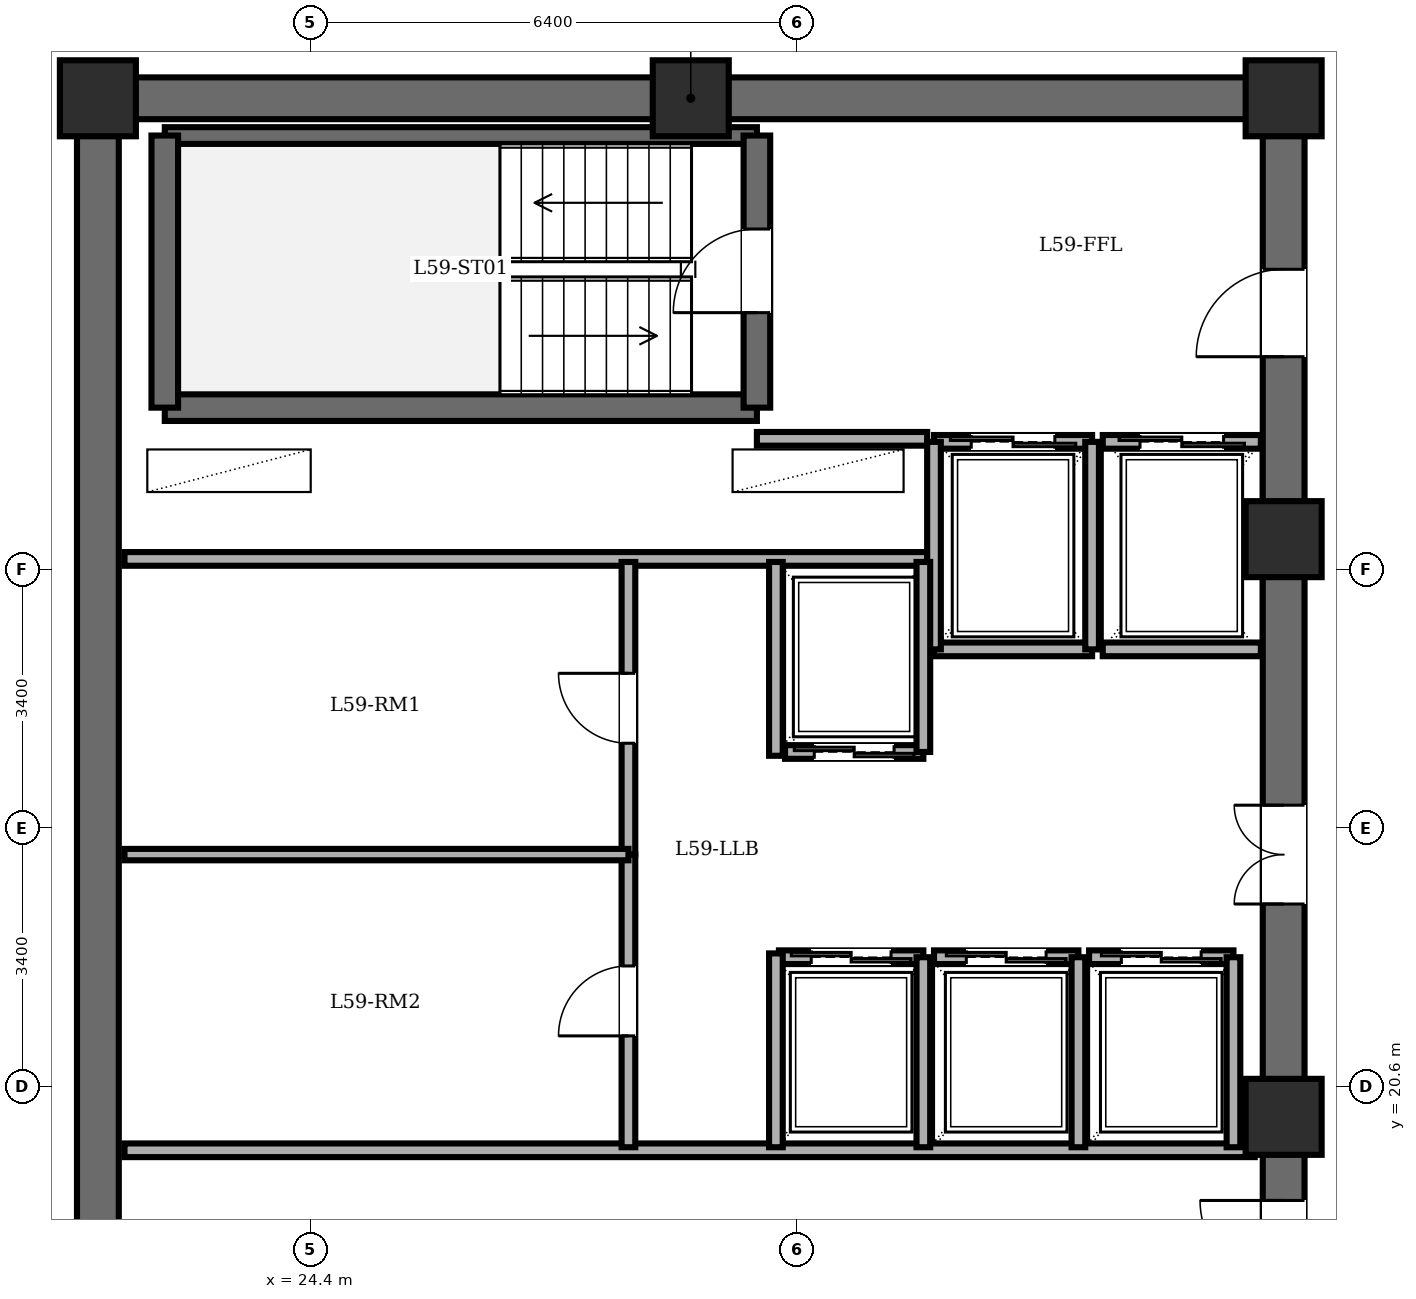
"""IFC4 building model, lengths in metres.
Left out: names, types, materials, properties, quantities, classifications, styles, units other than length and angle.
Written with IfcOpenShell. Run it as: python <this file> out.ifc"""

import sys

from ifc_helpers import new_model, si_unit, direction, frame, frame_2d, origin, origin_2d, place, context, subcontext, project, spatial, rectangle, extrude, element, fill, save


model = new_model("IFC4")
c1 = context("Model", 3, precision=1e-05, world=origin(), true_north=direction((0.0, 1.0)))
c2 = subcontext(c1, "Body", "Model", "MODEL_VIEW")
j1 = project(units=[si_unit("LENGTHUNIT", "METRE"), si_unit("PLANEANGLEUNIT", "RADIAN")], contexts=[c1])
p1 = place(None, origin())
s1 = spatial("IfcSite", under=j1, at=p1, CompositionType="ELEMENT")
p2 = place(p1, origin())
s2 = spatial("IfcBuilding", under=s1, at=p2, CompositionType="ELEMENT")
p3 = place(p2, frame((0.0, 0.0, 226.5)))
s3 = spatial("IfcBuildingStorey", under=s2, at=p3, CompositionType="ELEMENT", Elevation=226.5)
for number, where, z_axis, x_axis in (
    (1, (37.2, 20.2, 0.0), (0.0, 0.0, 1.0), (1.0, 0.0, 0.0)),
    (2, (37.2, 27.8, 0.0), (0.0, 0.0, 1.0), (1.0, 0.0, 0.0)),
    (3, (37.2, 33.6, 0.0), (0.0, 0.0, 1.0), (1.0, 0.0, 0.0)),
    (4, (29.4, 33.6, 0.0), (0.0, 0.0, 1.0), (1.0, 0.0, 0.0)),
    (5, (21.6, 33.6, 0.0), (0.0, 0.0, 1.0), (1.0, 0.0, 0.0)),
):
    element("IfcColumn", number, at=place(p3, frame(where, z_axis=z_axis, x_axis=x_axis)), inside=s3, PredefinedType="COLUMN", context=c2, shape_type="SweptSolid", body=[
        extrude(rectangle(XDim=1.0, YDim=1.0, at=origin_2d()), origin(), (0.0, 0.0, 1.0), 3.6),
    ])
p4 = place(p3, frame((21.6, 14.4, 0.0), z_axis=(0.0, 0.0, 1.0), x_axis=(0.0, 1.0, 0.0)))
e6 = element("IfcWall", 6, at=p4, inside=s3, PredefinedType="SHEAR", context=c2, shape_type="SweptSolid", body=[
    extrude(rectangle(XDim=19.2, YDim=0.55, at=frame_2d((9.6, 0.0))), origin(), (0.0, 0.0, 1.0), 3.4),
])
p5 = place(p3, frame((21.6, 33.6, 0.0), z_axis=(0.0, 0.0, 1.0), x_axis=(1.0, 0.0, 0.0)))
e7 = element("IfcWall", 7, at=p5, inside=s3, PredefinedType="SHEAR", context=c2, shape_type="SweptSolid", body=[
    extrude(rectangle(XDim=15.6, YDim=0.55, at=frame_2d((7.8, 0.0))), origin(), (0.0, 0.0, 1.0), 3.4),
])
p6 = place(p3, frame((37.2, 14.4, 0.0), z_axis=(0.0, 0.0, 1.0), x_axis=(0.0, 1.0, 0.0)))
e8 = element("IfcWall", 8, at=p6, inside=s3, PredefinedType="SHEAR", context=c2, shape_type="SweptSolid", body=[
    extrude(rectangle(XDim=19.2, YDim=0.55, at=frame_2d((9.6, 0.0))), origin(), (0.0, 0.0, 1.0), 3.4),
])
p7 = place(p6, frame((15.8, 0.0, 0.0)))
e9 = element("IfcOpeningElement", 9, at=p7, cuts=e8, PredefinedType="OPENING", context=c2, shape_type="SweptSolid", body=[
    extrude(rectangle(XDim=1.15, YDim=2.15, at=frame_2d((0.575, 1.075))), frame((0.0, 0.285, 0.0), z_axis=(0.0, -1.0, 0.0), x_axis=(1.0, 0.0, 0.0)), (0.0, 0.0, 1.0), 0.57),
])
p8 = place(p6, frame((3.6, 0.0, 0.0)))
e10 = element("IfcOpeningElement", 10, at=p8, cuts=e8, PredefinedType="OPENING", context=c2, shape_type="SweptSolid", body=[
    extrude(rectangle(XDim=1.1, YDim=2.15, at=frame_2d((0.55, 1.075))), frame((0.0, 0.285, 0.0), z_axis=(0.0, -1.0, 0.0), x_axis=(1.0, 0.0, 0.0)), (0.0, 0.0, 1.0), 0.57),
])
p9 = place(p6, frame((8.6, 0.0, 0.0)))
e11 = element("IfcOpeningElement", 11, at=p9, cuts=e8, PredefinedType="OPENING", context=c2, shape_type="SweptSolid", body=[
    extrude(rectangle(XDim=1.3, YDim=2.2, at=frame_2d((0.65, 1.1))), frame((0.0, 0.285, 0.0), z_axis=(0.0, -1.0, 0.0), x_axis=(1.0, 0.0, 0.0)), (0.0, 0.0, 1.0), 0.57),
])
p10 = place(p3, frame((22.48, 29.53, 0.0), z_axis=(0.0, 0.0, 1.0), x_axis=(1.0, 0.0, 0.0)))
e12 = element("IfcWall", 12, at=p10, inside=s3, PredefinedType="SOLIDWALL", context=c2, shape_type="SweptSolid", body=[
    extrude(rectangle(XDim=7.79, YDim=0.35, at=frame_2d((3.895, 0.0))), origin(), (0.0, 0.0, 1.0), 3.4),
])
p11 = place(p3, frame((22.48, 33.11, 0.0), z_axis=(0.0, 0.0, 1.0), x_axis=(1.0, 0.0, 0.0)))
e13 = element("IfcWall", 13, at=p11, inside=s3, PredefinedType="PARTITIONING", context=c2, shape_type="SweptSolid", body=[
    extrude(rectangle(XDim=7.79, YDim=0.22, at=frame_2d((3.895, 0.0))), origin(), (0.0, 0.0, 1.0), 3.4),
])
p12 = place(p3, frame((22.48, 29.53, 0.0), z_axis=(0.0, 0.0, 1.0), x_axis=(0.0, 1.0, 0.0)))
e14 = element("IfcWall", 14, at=p12, inside=s3, PredefinedType="SOLIDWALL", context=c2, shape_type="SweptSolid", body=[
    extrude(rectangle(XDim=3.58, YDim=0.35, at=frame_2d((1.79, 0.0))), origin(), (0.0, 0.0, 1.0), 3.4),
])
p13 = place(p3, frame((30.27, 29.53, 0.0), z_axis=(0.0, 0.0, 1.0), x_axis=(0.0, 1.0, 0.0)))
e15 = element("IfcWall", 15, at=p13, inside=s3, PredefinedType="SOLIDWALL", context=c2, shape_type="SweptSolid", body=[
    extrude(rectangle(XDim=3.58, YDim=0.35, at=frame_2d((1.79, 0.0))), origin(), (0.0, 0.0, 1.0), 3.4),
])
p14 = place(p13, frame((1.25, 0.0, 0.0)))
e16 = element("IfcOpeningElement", 16, at=p14, cuts=e15, PredefinedType="OPENING", context=c2, shape_type="SweptSolid", body=[
    extrude(rectangle(XDim=1.1, YDim=2.15, at=frame_2d((0.55, 1.075))), frame((0.0, 0.185, 0.0), z_axis=(0.0, -1.0, 0.0), x_axis=(1.0, 0.0, 0.0)), (0.0, 0.0, 1.0), 0.37),
])
p15 = place(p3, frame((30.27, 29.12, 0.0), z_axis=(0.0, 0.0, 1.0), x_axis=(1.0, 0.0, 0.0)))
e17 = element("IfcWall", 17, at=p15, inside=s3, PredefinedType="PARTITIONING", context=c2, shape_type="SweptSolid", body=[
    extrude(rectangle(XDim=2.24, YDim=0.18, at=frame_2d((1.12, 0.0))), origin(), (0.0, 0.0, 1.0), 3.4),
])
p16 = place(p3, frame((21.95, 27.54, 0.0), z_axis=(0.0, 0.0, 1.0), x_axis=(1.0, 0.0, 0.0)))
e18 = element("IfcWall", 18, at=p16, inside=s3, PredefinedType="PARTITIONING", context=c2, shape_type="SweptSolid", body=[
    extrude(rectangle(XDim=10.56, YDim=0.18, at=frame_2d((5.28, 0.0))), origin(), (0.0, 0.0, 1.0), 3.4),
])
p17 = place(p3, frame((21.95, 19.76, 0.0), z_axis=(0.0, 0.0, 1.0), x_axis=(1.0, 0.0, 0.0)))
e19 = element("IfcWall", 19, at=p17, inside=s3, PredefinedType="PARTITIONING", context=c2, shape_type="SweptSolid", body=[
    extrude(rectangle(XDim=14.87, YDim=0.18, at=frame_2d((7.435, 0.0))), origin(), (0.0, 0.0, 1.0), 3.4),
])
p18 = place(p3, frame((32.6, 29.08, 0.0), z_axis=(0.0, 0.0, 1.0), x_axis=(1.0, 0.0, 0.0)))
e20 = element("IfcWall", 20, at=p18, inside=s3, PredefinedType="PARTITIONING", context=c2, shape_type="SweptSolid", body=[
    extrude(rectangle(XDim=2.08, YDim=0.18, at=frame_2d((1.04, 0.0))), origin(), (0.0, 0.0, 1.0), 3.4),
])
p19 = place(p18, frame((0.49, 0.0, 0.0)))
e21 = element("IfcOpeningElement", 21, at=p19, cuts=e20, PredefinedType="OPENING", context=c2, shape_type="SweptSolid", body=[
    extrude(rectangle(XDim=1.1, YDim=2.2, at=frame_2d((0.55, 1.1))), frame((0.0, 0.1, 0.0), z_axis=(0.0, -1.0, 0.0), x_axis=(1.0, 0.0, 0.0)), (0.0, 0.0, 1.0), 0.2),
])
p20 = place(p3, frame((34.68, 26.35, 0.0), z_axis=(0.0, 0.0, 1.0), x_axis=(-1.0, 0.0, 0.0)))
e22 = element("IfcWall", 22, at=p20, inside=s3, PredefinedType="PARTITIONING", context=c2, shape_type="SweptSolid", body=[
    extrude(rectangle(XDim=2.08, YDim=0.18, at=frame_2d((1.04, 0.0))), origin(), (0.0, 0.0, 1.0), 3.4),
])
for number, where, z_axis, x_axis in (
    (23, (34.68, 26.35, 0.0), (0.0, 0.0, 1.0), (0.0, 1.0, 0.0)),
    (24, (32.6, 29.08, 0.0), (0.0, 0.0, 1.0), (0.0, -1.0, 0.0)),
):
    element("IfcWall", number, at=place(p3, frame(where, z_axis=z_axis, x_axis=x_axis)), inside=s3, PredefinedType="PARTITIONING", context=c2, shape_type="SweptSolid", body=[
        extrude(rectangle(XDim=2.73, YDim=0.18, at=frame_2d((1.365, 0.0))), origin(), (0.0, 0.0, 1.0), 3.4),
    ])
p21 = place(p3, frame((34.82, 29.08, 0.0), z_axis=(0.0, 0.0, 1.0), x_axis=(1.0, 0.0, 0.0)))
e25 = element("IfcWall", 25, at=p21, inside=s3, PredefinedType="PARTITIONING", context=c2, shape_type="SweptSolid", body=[
    extrude(rectangle(XDim=2.08, YDim=0.18, at=frame_2d((1.04, 0.0))), origin(), (0.0, 0.0, 1.0), 3.4),
])
p22 = place(p21, frame((0.49, 0.0, 0.0)))
e26 = element("IfcOpeningElement", 26, at=p22, cuts=e25, PredefinedType="OPENING", context=c2, shape_type="SweptSolid", body=[
    extrude(rectangle(XDim=1.1, YDim=2.2, at=frame_2d((0.55, 1.1))), frame((0.0, 0.1, 0.0), z_axis=(0.0, -1.0, 0.0), x_axis=(1.0, 0.0, 0.0)), (0.0, 0.0, 1.0), 0.2),
])
p23 = place(p3, frame((36.9, 26.35, 0.0), z_axis=(0.0, 0.0, 1.0), x_axis=(-1.0, 0.0, 0.0)))
e27 = element("IfcWall", 27, at=p23, inside=s3, PredefinedType="PARTITIONING", context=c2, shape_type="SweptSolid", body=[
    extrude(rectangle(XDim=2.08, YDim=0.18, at=frame_2d((1.04, 0.0))), origin(), (0.0, 0.0, 1.0), 3.4),
])
p24 = place(p3, frame((32.46, 25.0, 0.0), z_axis=(0.0, 0.0, 1.0), x_axis=(-1.0, 0.0, 0.0)))
e28 = element("IfcWall", 28, at=p24, inside=s3, PredefinedType="PARTITIONING", context=c2, shape_type="SweptSolid", body=[
    extrude(rectangle(XDim=1.82, YDim=0.18, at=frame_2d((0.91, 0.0))), origin(), (0.0, 0.0, 1.0), 3.4),
])
p25 = place(p24, frame((0.385, 0.0, 0.0)))
e29 = element("IfcOpeningElement", 29, at=p25, cuts=e28, PredefinedType="OPENING", context=c2, shape_type="SweptSolid", body=[
    extrude(rectangle(XDim=1.05, YDim=2.2, at=frame_2d((0.525, 1.1))), frame((0.0, 0.1, 0.0), z_axis=(0.0, -1.0, 0.0), x_axis=(1.0, 0.0, 0.0)), (0.0, 0.0, 1.0), 0.2),
])
p26 = place(p3, frame((32.46, 25.0, 0.0), z_axis=(0.0, 0.0, 1.0), x_axis=(0.0, 1.0, 0.0)))
e30 = element("IfcWall", 30, at=p26, inside=s3, PredefinedType="PARTITIONING", context=c2, shape_type="SweptSolid", body=[
    extrude(rectangle(XDim=2.5, YDim=0.18, at=frame_2d((1.25, 0.0))), origin(), (0.0, 0.0, 1.0), 3.4),
])
p27 = place(p3, frame((30.56, 22.3, 0.0), z_axis=(0.0, 0.0, 1.0), x_axis=(1.0, 0.0, 0.0)))
e31 = element("IfcWall", 31, at=p27, inside=s3, PredefinedType="PARTITIONING", context=c2, shape_type="SweptSolid", body=[
    extrude(rectangle(XDim=1.9, YDim=0.18, at=frame_2d((0.95, 0.0))), origin(), (0.0, 0.0, 1.0), 3.4),
])
p28 = place(p27, frame((0.425, 0.0, 0.0)))
e32 = element("IfcOpeningElement", 32, at=p28, cuts=e31, PredefinedType="OPENING", context=c2, shape_type="SweptSolid", body=[
    extrude(rectangle(XDim=1.05, YDim=2.2, at=frame_2d((0.525, 1.1))), frame((0.0, 0.1, 0.0), z_axis=(0.0, -1.0, 0.0), x_axis=(1.0, 0.0, 0.0)), (0.0, 0.0, 1.0), 0.2),
])
p29 = place(p3, frame((32.46, 19.8, 0.0), z_axis=(0.0, 0.0, 1.0), x_axis=(0.0, 1.0, 0.0)))
e33 = element("IfcWall", 33, at=p29, inside=s3, PredefinedType="PARTITIONING", context=c2, shape_type="SweptSolid", body=[
    extrude(rectangle(XDim=2.5, YDim=0.18, at=frame_2d((1.25, 0.0))), origin(), (0.0, 0.0, 1.0), 3.4),
])
p30 = place(p3, frame((32.6, 22.3, 0.0), z_axis=(0.0, 0.0, 1.0), x_axis=(1.0, 0.0, 0.0)))
e34 = element("IfcWall", 34, at=p30, inside=s3, PredefinedType="PARTITIONING", context=c2, shape_type="SweptSolid", body=[
    extrude(rectangle(XDim=1.9, YDim=0.18, at=frame_2d((0.95, 0.0))), origin(), (0.0, 0.0, 1.0), 3.4),
])
p31 = place(p30, frame((0.425, 0.0, 0.0)))
e35 = element("IfcOpeningElement", 35, at=p31, cuts=e34, PredefinedType="OPENING", context=c2, shape_type="SweptSolid", body=[
    extrude(rectangle(XDim=1.05, YDim=2.2, at=frame_2d((0.525, 1.1))), frame((0.0, 0.1, 0.0), z_axis=(0.0, -1.0, 0.0), x_axis=(1.0, 0.0, 0.0)), (0.0, 0.0, 1.0), 0.2),
])
p32 = place(p3, frame((34.5, 19.8, 0.0), z_axis=(0.0, 0.0, 1.0), x_axis=(0.0, 1.0, 0.0)))
e36 = element("IfcWall", 36, at=p32, inside=s3, PredefinedType="PARTITIONING", context=c2, shape_type="SweptSolid", body=[
    extrude(rectangle(XDim=2.5, YDim=0.18, at=frame_2d((1.25, 0.0))), origin(), (0.0, 0.0, 1.0), 3.4),
])
p33 = place(p3, frame((34.64, 22.3, 0.0), z_axis=(0.0, 0.0, 1.0), x_axis=(1.0, 0.0, 0.0)))
e37 = element("IfcWall", 37, at=p33, inside=s3, PredefinedType="PARTITIONING", context=c2, shape_type="SweptSolid", body=[
    extrude(rectangle(XDim=1.9, YDim=0.18, at=frame_2d((0.95, 0.0))), origin(), (0.0, 0.0, 1.0), 3.4),
])
p34 = place(p33, frame((0.425, 0.0, 0.0)))
e38 = element("IfcOpeningElement", 38, at=p34, cuts=e37, PredefinedType="OPENING", context=c2, shape_type="SweptSolid", body=[
    extrude(rectangle(XDim=1.05, YDim=2.2, at=frame_2d((0.525, 1.1))), frame((0.0, 0.1, 0.0), z_axis=(0.0, -1.0, 0.0), x_axis=(1.0, 0.0, 0.0)), (0.0, 0.0, 1.0), 0.2),
])
p35 = place(p3, frame((36.54, 19.8, 0.0), z_axis=(0.0, 0.0, 1.0), x_axis=(0.0, 1.0, 0.0)))
e39 = element("IfcWall", 39, at=p35, inside=s3, PredefinedType="PARTITIONING", context=c2, shape_type="SweptSolid", body=[
    extrude(rectangle(XDim=2.5, YDim=0.18, at=frame_2d((1.25, 0.0))), origin(), (0.0, 0.0, 1.0), 3.4),
])
for number, where, z_axis, x_axis in (
    (40, (30.52, 24.95, 0.0), (0.0, 0.0, 1.0), (0.0, 1.0, 0.0)),
    (41, (30.52, 19.8, 0.0), (0.0, 0.0, 1.0), (0.0, 1.0, 0.0)),
):
    element("IfcWall", number, at=place(p3, frame(where, z_axis=z_axis, x_axis=x_axis)), inside=s3, PredefinedType="PARTITIONING", context=c2, shape_type="SweptSolid", body=[
        extrude(rectangle(XDim=2.55, YDim=0.18, at=frame_2d((1.275, 0.0))), origin(), (0.0, 0.0, 1.0), 3.4),
    ])
p36 = place(p3, frame((28.58, 23.65, 0.0), z_axis=(0.0, 0.0, 1.0), x_axis=(0.0, 1.0, 0.0)))
e42 = element("IfcWall", 42, at=p36, inside=s3, PredefinedType="PARTITIONING", context=c2, shape_type="SweptSolid", body=[
    extrude(rectangle(XDim=3.85, YDim=0.18, at=frame_2d((1.925, 0.0))), origin(), (0.0, 0.0, 1.0), 3.4),
])
p37 = place(p36, frame((1.465, 0.0, 0.0)))
e43 = element("IfcOpeningElement", 43, at=p37, cuts=e42, PredefinedType="OPENING", context=c2, shape_type="SweptSolid", body=[
    extrude(rectangle(XDim=0.92, YDim=2.1, at=frame_2d((0.46, 1.05))), frame((0.0, 0.1, 0.0), z_axis=(0.0, -1.0, 0.0), x_axis=(1.0, 0.0, 0.0)), (0.0, 0.0, 1.0), 0.2),
])
p38 = place(p3, frame((28.58, 19.8, 0.0), z_axis=(0.0, 0.0, 1.0), x_axis=(0.0, 1.0, 0.0)))
e44 = element("IfcWall", 44, at=p38, inside=s3, PredefinedType="PARTITIONING", context=c2, shape_type="SweptSolid", body=[
    extrude(rectangle(XDim=3.85, YDim=0.18, at=frame_2d((1.925, 0.0))), origin(), (0.0, 0.0, 1.0), 3.4),
])
p39 = place(p38, frame((1.465, 0.0, 0.0)))
e45 = element("IfcOpeningElement", 45, at=p39, cuts=e44, PredefinedType="OPENING", context=c2, shape_type="SweptSolid", body=[
    extrude(rectangle(XDim=0.92, YDim=2.1, at=frame_2d((0.46, 1.05))), frame((0.0, 0.1, 0.0), z_axis=(0.0, -1.0, 0.0), x_axis=(1.0, 0.0, 0.0)), (0.0, 0.0, 1.0), 0.2),
])
p40 = place(p3, frame((21.95, 23.65, 0.0), z_axis=(0.0, 0.0, 1.0), x_axis=(1.0, 0.0, 0.0)))
e46 = element("IfcWall", 46, at=p40, inside=s3, PredefinedType="PARTITIONING", context=c2, shape_type="SweptSolid", body=[
    extrude(rectangle(XDim=6.63, YDim=0.15, at=frame_2d((3.315, 0.0))), origin(), (0.0, 0.0, 1.0), 3.4),
])
p41 = place(p14, origin())
e47 = element("IfcDoor", 47, at=p41, inside=s3, OperationType="SINGLE_SWING_LEFT", PredefinedType="DOOR", context=c2, shape_type="SweptSolid", body=[
    extrude(rectangle(XDim=1.1, YDim=2.15, at=frame_2d((0.55, 1.075))), frame((0.0, 0.025, 0.0), z_axis=(0.0, -1.0, 0.0), x_axis=(1.0, 0.0, 0.0)), (0.0, 0.0, 1.0), 0.05),
])
fill(e16, e47)
p42 = place(p7, origin())
e48 = element("IfcDoor", 48, at=p42, inside=s3, OperationType="SINGLE_SWING_LEFT", PredefinedType="DOOR", context=c2, shape_type="SweptSolid", body=[
    extrude(rectangle(XDim=1.15, YDim=2.15, at=frame_2d((0.575, 1.075))), frame((0.0, 0.025, 0.0), z_axis=(0.0, -1.0, 0.0), x_axis=(1.0, 0.0, 0.0)), (0.0, 0.0, 1.0), 0.05),
])
fill(e9, e48)
p43 = place(p8, origin())
e49 = element("IfcDoor", 49, at=p43, inside=s3, OperationType="SINGLE_SWING_RIGHT", PredefinedType="DOOR", context=c2, shape_type="SweptSolid", body=[
    extrude(rectangle(XDim=1.1, YDim=2.15, at=frame_2d((0.55, 1.075))), frame((0.0, 0.025, 0.0), z_axis=(0.0, -1.0, 0.0), x_axis=(1.0, 0.0, 0.0)), (0.0, 0.0, 1.0), 0.05),
])
fill(e10, e49)
p44 = place(p19, origin())
e50 = element("IfcDoor", 50, at=p44, inside=s3, OperationType="DOUBLE_DOOR_SLIDING", PredefinedType="DOOR", context=c2, shape_type="SweptSolid", body=[
    extrude(rectangle(XDim=1.1, YDim=2.2, at=frame_2d((0.55, 1.1))), frame((0.0, 0.025, 0.0), z_axis=(0.0, -1.0, 0.0), x_axis=(1.0, 0.0, 0.0)), (0.0, 0.0, 1.0), 0.05),
])
fill(e21, e50)
p45 = place(p22, origin())
e51 = element("IfcDoor", 51, at=p45, inside=s3, OperationType="DOUBLE_DOOR_SLIDING", PredefinedType="DOOR", context=c2, shape_type="SweptSolid", body=[
    extrude(rectangle(XDim=1.1, YDim=2.2, at=frame_2d((0.55, 1.1))), frame((0.0, 0.025, 0.0), z_axis=(0.0, -1.0, 0.0), x_axis=(1.0, 0.0, 0.0)), (0.0, 0.0, 1.0), 0.05),
])
fill(e26, e51)
p46 = place(p25, origin())
e52 = element("IfcDoor", 52, at=p46, inside=s3, OperationType="DOUBLE_DOOR_SLIDING", PredefinedType="DOOR", context=c2, shape_type="SweptSolid", body=[
    extrude(rectangle(XDim=1.05, YDim=2.2, at=frame_2d((0.525, 1.1))), frame((0.0, 0.025, 0.0), z_axis=(0.0, -1.0, 0.0), x_axis=(1.0, 0.0, 0.0)), (0.0, 0.0, 1.0), 0.05),
])
fill(e29, e52)
p47 = place(p28, origin())
e53 = element("IfcDoor", 53, at=p47, inside=s3, OperationType="DOUBLE_DOOR_SLIDING", PredefinedType="DOOR", context=c2, shape_type="SweptSolid", body=[
    extrude(rectangle(XDim=1.05, YDim=2.2, at=frame_2d((0.525, 1.1))), frame((0.0, 0.025, 0.0), z_axis=(0.0, -1.0, 0.0), x_axis=(1.0, 0.0, 0.0)), (0.0, 0.0, 1.0), 0.05),
])
fill(e32, e53)
p48 = place(p31, origin())
e54 = element("IfcDoor", 54, at=p48, inside=s3, OperationType="DOUBLE_DOOR_SLIDING", PredefinedType="DOOR", context=c2, shape_type="SweptSolid", body=[
    extrude(rectangle(XDim=1.05, YDim=2.2, at=frame_2d((0.525, 1.1))), frame((0.0, 0.025, 0.0), z_axis=(0.0, -1.0, 0.0), x_axis=(1.0, 0.0, 0.0)), (0.0, 0.0, 1.0), 0.05),
])
fill(e35, e54)
p49 = place(p34, origin())
e55 = element("IfcDoor", 55, at=p49, inside=s3, OperationType="DOUBLE_DOOR_SLIDING", PredefinedType="DOOR", context=c2, shape_type="SweptSolid", body=[
    extrude(rectangle(XDim=1.05, YDim=2.2, at=frame_2d((0.525, 1.1))), frame((0.0, 0.025, 0.0), z_axis=(0.0, -1.0, 0.0), x_axis=(1.0, 0.0, 0.0)), (0.0, 0.0, 1.0), 0.05),
])
fill(e38, e55)
p50 = place(p37, origin())
e56 = element("IfcDoor", 56, at=p50, inside=s3, OperationType="SINGLE_SWING_RIGHT", PredefinedType="DOOR", context=c2, shape_type="SweptSolid", body=[
    extrude(rectangle(XDim=0.92, YDim=2.1, at=frame_2d((0.46, 1.05))), frame((0.0, 0.025, 0.0), z_axis=(0.0, -1.0, 0.0), x_axis=(1.0, 0.0, 0.0)), (0.0, 0.0, 1.0), 0.05),
])
fill(e43, e56)
p51 = place(p39, origin())
e57 = element("IfcDoor", 57, at=p51, inside=s3, OperationType="SINGLE_SWING_LEFT", PredefinedType="DOOR", context=c2, shape_type="SweptSolid", body=[
    extrude(rectangle(XDim=0.92, YDim=2.1, at=frame_2d((0.46, 1.05))), frame((0.0, 0.025, 0.0), z_axis=(0.0, -1.0, 0.0), x_axis=(1.0, 0.0, 0.0)), (0.0, 0.0, 1.0), 0.05),
])
fill(e45, e57)
p52 = place(p9, origin())
e58 = element("IfcDoor", 58, at=p52, inside=s3, OperationType="DOUBLE_DOOR_SINGLE_SWING", PredefinedType="DOOR", context=c2, shape_type="SweptSolid", body=[
    extrude(rectangle(XDim=1.3, YDim=2.2, at=frame_2d((0.65, 1.1))), frame((0.0, 0.025, 0.0), z_axis=(0.0, -1.0, 0.0), x_axis=(1.0, 0.0, 0.0)), (0.0, 0.0, 1.0), 0.05),
])
fill(e11, e58)
save(model, sys.argv[1])
